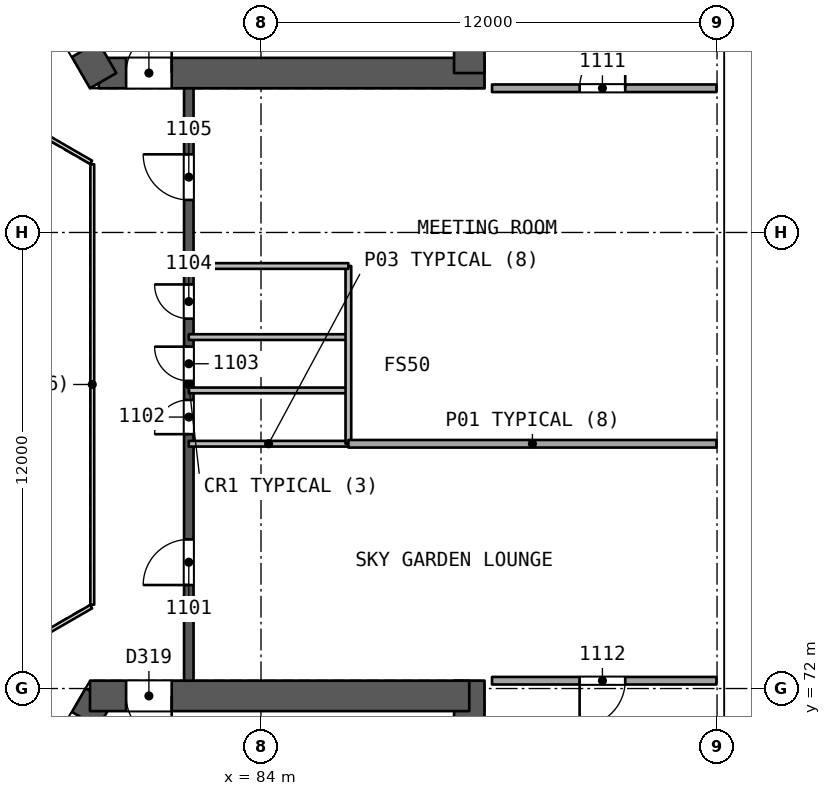
"""IFC4 building model, lengths in metres.
Left out: names, types, materials, properties, quantities, classifications, styles, units other than length and angle.
Written with IfcOpenShell. Run it as: python <this file> out.ifc"""

import sys

from ifc_helpers import new_model, si_unit, direction, frame, frame_2d, origin, place, context, subcontext, project, spatial, rectangle, extrude, element, fill, save


model = new_model("IFC4")
c1 = context("Model", 3, precision=1e-05, world=origin(), true_north=direction((0.0, 1.0)))
c2 = subcontext(c1, "Body", "Model", "MODEL_VIEW")
j1 = project(units=[si_unit("LENGTHUNIT", "METRE"), si_unit("PLANEANGLEUNIT", "RADIAN")], contexts=[c1])
p1 = place(None, origin())
s1 = spatial("IfcSite", under=j1, at=p1, CompositionType="ELEMENT")
p2 = place(p1, origin())
s2 = spatial("IfcBuilding", under=s1, at=p2, CompositionType="ELEMENT")
p3 = place(p2, frame((0.0, 0.0, 52.9)))
s3 = spatial("IfcBuildingStorey", under=s2, at=p3, CompositionType="ELEMENT", Elevation=52.9)
p4 = place(p3, frame((79.731, 88.194, 0.0), z_axis=(0.0, 0.0, 1.0), x_axis=(1.0, 0.0, 0.0)))
e1 = element("IfcWall", 1, at=p4, inside=s3, PredefinedType="SHEAR", context=c2, shape_type="SweptSolid", body=[
    extrude(rectangle(XDim=10.149, YDim=0.8, at=frame_2d((5.074, 0.0))), origin(), (0.0, 0.0, 1.0), 4.4),
])
p5 = place(p4, frame((0.719, 0.0, 0.0)))
e2 = element("IfcOpeningElement", 2, at=p5, cuts=e1, PredefinedType="OPENING", context=c2, shape_type="SweptSolid", body=[
    extrude(rectangle(XDim=1.2, YDim=2.1, at=frame_2d((0.6, 1.05))), frame((0.0, 0.411, 0.0), z_axis=(0.0, -1.0, 0.0), x_axis=(1.0, 0.0, 0.0)), (0.0, 0.0, 1.0), 0.821),
])
p6 = place(p3, frame((89.48, 88.194, 0.0), z_axis=(0.0, 0.0, 1.0), x_axis=(0.0, 1.0, 0.0)))
e3 = element("IfcWall", 3, at=p6, inside=s3, PredefinedType="SHEAR", context=c2, shape_type="SweptSolid", body=[
    extrude(rectangle(XDim=13.933, YDim=0.8, at=frame_2d((6.967, 0.0))), origin(), (0.0, 0.0, 1.0), 4.4),
])
p7 = place(p3, frame((74.856, 96.637, 0.0), z_axis=(0.0, 0.0, 1.0), x_axis=(0.499993500917, -0.866029155999, 0.0)))
e4 = element("IfcWall", 4, at=p7, inside=s3, PredefinedType="SHEAR", context=c2, shape_type="SweptSolid", body=[
    extrude(rectangle(XDim=9.98, YDim=0.8, at=frame_2d((4.99, 0.0))), origin(), (0.0, 0.0, 1.0), 4.4),
])
p8 = place(p7, frame((7.83, 0.0, 0.0)))
e5 = element("IfcOpeningElement", 5, at=p8, cuts=e4, PredefinedType="OPENING", context=c2, shape_type="SweptSolid", body=[
    extrude(rectangle(XDim=1.2, YDim=2.1, at=frame_2d((0.6, 1.05))), frame((0.0, 0.411, 0.0), z_axis=(0.0, -1.0, 0.0), x_axis=(1.0, 0.0, 0.0)), (0.0, 0.0, 1.0), 0.821),
])
p9 = place(p3, frame((79.731, 71.806, 0.0), z_axis=(0.0, 0.0, 1.0), x_axis=(-0.49999662545, -0.866027352073, 0.0)))
e6 = element("IfcWall", 6, at=p9, inside=s3, PredefinedType="SHEAR", context=c2, shape_type="SweptSolid", body=[
    extrude(rectangle(XDim=10.149, YDim=0.8, at=frame_2d((5.074, 0.0))), origin(), (0.0, 0.0, 1.0), 4.4),
])
p10 = place(p9, frame((0.719, 0.0, 0.0)))
e7 = element("IfcOpeningElement", 7, at=p10, cuts=e6, PredefinedType="OPENING", context=c2, shape_type="SweptSolid", body=[
    extrude(rectangle(XDim=1.2, YDim=2.1, at=frame_2d((0.6, 1.05))), frame((0.0, 0.411, 0.0), z_axis=(0.0, -1.0, 0.0), x_axis=(1.0, 0.0, 0.0)), (0.0, 0.0, 1.0), 0.821),
])
p11 = place(p3, frame((89.48, 58.103, 0.0), z_axis=(0.0, 0.0, 1.0), x_axis=(0.0, 1.0, 0.0)))
e8 = element("IfcWall", 8, at=p11, inside=s3, PredefinedType="SHEAR", context=c2, shape_type="SweptSolid", body=[
    extrude(rectangle(XDim=14.103, YDim=0.8, at=frame_2d((7.051, 0.0))), origin(), (0.0, 0.0, 1.0), 4.4),
])
p12 = place(p3, frame((89.48, 71.806, 0.0), z_axis=(0.0, 0.0, 1.0), x_axis=(-1.0, 0.0, 0.0)))
e9 = element("IfcWall", 9, at=p12, inside=s3, PredefinedType="SHEAR", context=c2, shape_type="SweptSolid", body=[
    extrude(rectangle(XDim=9.98, YDim=0.8, at=frame_2d((4.99, 0.0))), origin(), (0.0, 0.0, 1.0), 4.4),
])
p13 = place(p12, frame((7.83, 0.0, 0.0)))
e10 = element("IfcOpeningElement", 10, at=p13, cuts=e9, PredefinedType="OPENING", context=c2, shape_type="SweptSolid", body=[
    extrude(rectangle(XDim=1.2, YDim=2.1, at=frame_2d((0.6, 1.05))), frame((0.0, 0.411, 0.0), z_axis=(0.0, -1.0, 0.0), x_axis=(1.0, 0.0, 0.0)), (0.0, 0.0, 1.0), 0.821),
])
p14 = place(p3, frame((82.1, 72.206, 0.0), z_axis=(0.0, 0.0, 1.0), x_axis=(0.0, 1.0, 0.0)))
e11 = element("IfcWall", 11, at=p14, inside=s3, PredefinedType="SHEAR", context=c2, shape_type="SweptSolid", body=[
    extrude(rectangle(XDim=15.588, YDim=0.25, at=frame_2d((7.794, 0.0))), origin(), (0.0, 0.0, 1.0), 3.9),
])
p15 = place(p14, frame((2.518, 0.0, 0.0)))
e12 = element("IfcOpeningElement", 12, at=p15, cuts=e11, PredefinedType="OPENING", context=c2, shape_type="SweptSolid", body=[
    extrude(rectangle(XDim=1.2, YDim=2.4, at=frame_2d((0.6, 1.2))), frame((0.0, 0.135, 0.0), z_axis=(0.0, -1.0, 0.0), x_axis=(1.0, 0.0, 0.0)), (0.0, 0.0, 1.0), 0.271),
])
p16 = place(p14, frame((6.487, 0.0, 0.0)))
e13 = element("IfcOpeningElement", 13, at=p16, cuts=e11, PredefinedType="OPENING", context=c2, shape_type="SweptSolid", body=[
    extrude(rectangle(XDim=0.9, YDim=2.1, at=frame_2d((0.45, 1.05))), frame((0.0, 0.135, 0.0), z_axis=(0.0, -1.0, 0.0), x_axis=(1.0, 0.0, 0.0)), (0.0, 0.0, 1.0), 0.271),
])
p17 = place(p14, frame((7.89, 0.0, 0.0)))
e14 = element("IfcOpeningElement", 14, at=p17, cuts=e11, PredefinedType="OPENING", context=c2, shape_type="SweptSolid", body=[
    extrude(rectangle(XDim=0.9, YDim=2.1, at=frame_2d((0.45, 1.05))), frame((0.0, 0.135, 0.0), z_axis=(0.0, -1.0, 0.0), x_axis=(1.0, 0.0, 0.0)), (0.0, 0.0, 1.0), 0.271),
])
p18 = place(p14, frame((9.527, 0.0, 0.0)))
e15 = element("IfcOpeningElement", 15, at=p18, cuts=e11, PredefinedType="OPENING", context=c2, shape_type="SweptSolid", body=[
    extrude(rectangle(XDim=0.9, YDim=2.1, at=frame_2d((0.45, 1.05))), frame((0.0, 0.135, 0.0), z_axis=(0.0, -1.0, 0.0), x_axis=(1.0, 0.0, 0.0)), (0.0, 0.0, 1.0), 0.271),
])
p19 = place(p14, frame((12.65, 0.0, 0.0)))
e16 = element("IfcOpeningElement", 16, at=p19, cuts=e11, PredefinedType="OPENING", context=c2, shape_type="SweptSolid", body=[
    extrude(rectangle(XDim=1.2, YDim=2.4, at=frame_2d((0.6, 1.2))), frame((0.0, 0.135, 0.0), z_axis=(0.0, -1.0, 0.0), x_axis=(1.0, 0.0, 0.0)), (0.0, 0.0, 1.0), 0.271),
])
p20 = place(p3, frame((86.3, 78.441, 0.0), z_axis=(0.0, 0.0, 1.0), x_axis=(-1.0, 0.0, 0.0)))
e17 = element("IfcWall", 17, at=p20, inside=s3, PredefinedType="PARTITIONING", context=c2, shape_type="SweptSolid", body=[
    extrude(rectangle(XDim=4.2, YDim=0.15, at=frame_2d((2.1, 0.0))), origin(), (0.0, 0.0, 1.0), 3.9),
])
p21 = place(p3, frame((95.984, 78.44, 0.0), z_axis=(0.0, 0.0, 1.0), x_axis=(-1.0, 0.0, 0.0)))
e18 = element("IfcWall", 18, at=p21, inside=s3, PredefinedType="PARTITIONING", context=c2, shape_type="SweptSolid", body=[
    extrude(rectangle(XDim=9.684, YDim=0.2, at=frame_2d((4.842, 0.0))), origin(), (0.0, 0.0, 1.0), 3.9),
])
p22 = place(p3, frame((95.984, 72.206, 0.0), z_axis=(0.0, 0.0, 1.0), x_axis=(-1.0, 0.0, 0.0)))
e19 = element("IfcWall", 19, at=p22, inside=s3, PredefinedType="PARTITIONING", context=c2, shape_type="SweptSolid", body=[
    extrude(rectangle(XDim=5.905, YDim=0.2, at=frame_2d((2.952, 0.0))), origin(), (0.0, 0.0, 1.0), 3.9),
])
p23 = place(p22, frame((2.4, 0.0, 0.0)))
e20 = element("IfcOpeningElement", 20, at=p23, cuts=e19, PredefinedType="OPENING", context=c2, shape_type="SweptSolid", body=[
    extrude(rectangle(XDim=1.2, YDim=2.4, at=frame_2d((0.6, 1.2))), frame((0.0, 0.11, 0.0), z_axis=(0.0, -1.0, 0.0), x_axis=(1.0, 0.0, 0.0)), (0.0, 0.0, 1.0), 0.221),
])
for number, where, z_axis, x_axis in (
    (21, (86.3, 79.844, 0.0), (0.0, 0.0, 1.0), (-1.0, 0.0, 0.0)),
    (22, (86.3, 81.247, 0.0), (0.0, 0.0, 1.0), (-1.0, 0.0, 0.0)),
):
    element("IfcWall", number, at=place(p3, frame(where, z_axis=z_axis, x_axis=x_axis)), inside=s3, PredefinedType="PARTITIONING", context=c2, shape_type="SweptSolid", body=[
        extrude(rectangle(XDim=4.2, YDim=0.15, at=frame_2d((2.1, 0.0))), origin(), (0.0, 0.0, 1.0), 3.9),
    ])
p24 = place(p3, frame((86.299, 78.441, 0.0), z_axis=(0.0, 0.0, 1.0), x_axis=(0.0, 1.0, 0.0)))
e23 = element("IfcWall", 23, at=p24, inside=s3, PredefinedType="PARTITIONING", context=c2, shape_type="SweptSolid", body=[
    extrude(rectangle(XDim=4.677, YDim=0.15, at=frame_2d((2.338, 0.0))), origin(), (0.0, 0.0, 1.0), 3.9),
])
p25 = place(p3, frame((86.299, 83.118, 0.0), z_axis=(0.0, 0.0, 1.0), x_axis=(-1.0, 0.0, 0.0)))
e24 = element("IfcWall", 24, at=p25, inside=s3, PredefinedType="PARTITIONING", context=c2, shape_type="SweptSolid", body=[
    extrude(rectangle(XDim=4.199, YDim=0.15, at=frame_2d((2.1, 0.0))), origin(), (0.0, 0.0, 1.0), 3.9),
])
p26 = place(p3, frame((90.079, 87.794, 0.0), z_axis=(0.0, 0.0, 1.0), x_axis=(1.0, 0.0, 0.0)))
e25 = element("IfcWall", 25, at=p26, inside=s3, PredefinedType="PARTITIONING", context=c2, shape_type="SweptSolid", body=[
    extrude(rectangle(XDim=5.905, YDim=0.2, at=frame_2d((2.952, 0.0))), origin(), (0.0, 0.0, 1.0), 3.9),
])
p27 = place(p26, frame((2.305, 0.0, 0.0)))
e26 = element("IfcOpeningElement", 26, at=p27, cuts=e25, PredefinedType="OPENING", context=c2, shape_type="SweptSolid", body=[
    extrude(rectangle(XDim=1.2, YDim=2.4, at=frame_2d((0.6, 1.2))), frame((0.0, 0.11, 0.0), z_axis=(0.0, -1.0, 0.0), x_axis=(1.0, 0.0, 0.0)), (0.0, 0.0, 1.0), 0.221),
])
p28 = place(p3, frame((79.56, 74.206, 0.0), z_axis=(0.0, 0.0, 1.0), x_axis=(0.0, 1.0, 0.0)))
e27 = element("IfcWall", 27, at=p28, inside=s3, PredefinedType="PARTITIONING", context=c2, shape_type="SweptSolid", body=[
    extrude(rectangle(XDim=11.588, YDim=0.1, at=frame_2d((5.794, 0.0))), origin(), (0.0, 0.0, 1.0), 3.9),
])
for number, where, z_axis, x_axis in (
    (28, (79.53, 85.846, 0.0), (0.0, 0.0, 1.0), (-0.866, 0.5, 0.0)),
    (29, (77.798, 73.154, 0.0), (0.0, 0.0, 1.0), (0.866, 0.5, 0.0)),
):
    element("IfcWall", number, at=place(p3, frame(where, z_axis=z_axis, x_axis=x_axis)), inside=s3, PredefinedType="PARTITIONING", context=c2, shape_type="SweptSolid", body=[
        extrude(rectangle(XDim=2.0, YDim=0.1, at=frame_2d((1.0, 0.0))), origin(), (0.0, 0.0, 1.0), 3.9),
    ])
p29 = place(p15, origin())
e30 = element("IfcDoor", 30, at=p29, inside=s3, OperationType="SINGLE_SWING_LEFT", PredefinedType="NOTDEFINED", context=c2, shape_type="SweptSolid", body=[
    extrude(rectangle(XDim=1.2, YDim=2.4, at=frame_2d((0.6, 1.2))), frame((0.0, 0.025, 0.0), z_axis=(0.0, -1.0, 0.0), x_axis=(1.0, 0.0, 0.0)), (0.0, 0.0, 1.0), 0.05),
])
fill(e12, e30)
p30 = place(p16, origin())
e31 = element("IfcDoor", 31, at=p30, inside=s3, OperationType="SINGLE_SWING_LEFT", PredefinedType="NOTDEFINED", context=c2, shape_type="SweptSolid", body=[
    extrude(rectangle(XDim=0.9, YDim=2.1, at=frame_2d((0.45, 1.05))), frame((0.0, 0.025, 0.0), z_axis=(0.0, -1.0, 0.0), x_axis=(1.0, 0.0, 0.0)), (0.0, 0.0, 1.0), 0.05),
])
fill(e13, e31)
p31 = place(p17, origin())
e32 = element("IfcDoor", 32, at=p31, inside=s3, OperationType="SINGLE_SWING_RIGHT", PredefinedType="NOTDEFINED", context=c2, shape_type="SweptSolid", body=[
    extrude(rectangle(XDim=0.9, YDim=2.1, at=frame_2d((0.45, 1.05))), frame((0.0, 0.025, 0.0), z_axis=(0.0, -1.0, 0.0), x_axis=(1.0, 0.0, 0.0)), (0.0, 0.0, 1.0), 0.05),
])
fill(e14, e32)
p32 = place(p18, origin())
e33 = element("IfcDoor", 33, at=p32, inside=s3, OperationType="SINGLE_SWING_RIGHT", PredefinedType="NOTDEFINED", context=c2, shape_type="SweptSolid", body=[
    extrude(rectangle(XDim=0.9, YDim=2.1, at=frame_2d((0.45, 1.05))), frame((0.0, 0.025, 0.0), z_axis=(0.0, -1.0, 0.0), x_axis=(1.0, 0.0, 0.0)), (0.0, 0.0, 1.0), 0.05),
])
fill(e15, e33)
p33 = place(p19, origin())
e34 = element("IfcDoor", 34, at=p33, inside=s3, OperationType="SINGLE_SWING_RIGHT", PredefinedType="NOTDEFINED", context=c2, shape_type="SweptSolid", body=[
    extrude(rectangle(XDim=1.2, YDim=2.4, at=frame_2d((0.6, 1.2))), frame((0.0, 0.025, 0.0), z_axis=(0.0, -1.0, 0.0), x_axis=(1.0, 0.0, 0.0)), (0.0, 0.0, 1.0), 0.05),
])
fill(e16, e34)
p34 = place(p27, origin())
e35 = element("IfcDoor", 35, at=p34, inside=s3, OperationType="SINGLE_SWING_RIGHT", PredefinedType="NOTDEFINED", context=c2, shape_type="SweptSolid", body=[
    extrude(rectangle(XDim=1.2, YDim=2.4, at=frame_2d((0.6, 1.2))), frame((0.0, 0.025, 0.0), z_axis=(0.0, -1.0, 0.0), x_axis=(1.0, 0.0, 0.0)), (0.0, 0.0, 1.0), 0.05),
])
fill(e26, e35)
p35 = place(p23, origin())
e36 = element("IfcDoor", 36, at=p35, inside=s3, OperationType="SINGLE_SWING_RIGHT", PredefinedType="NOTDEFINED", context=c2, shape_type="SweptSolid", body=[
    extrude(rectangle(XDim=1.2, YDim=2.4, at=frame_2d((0.6, 1.2))), frame((0.0, 0.025, 0.0), z_axis=(0.0, -1.0, 0.0), x_axis=(1.0, 0.0, 0.0)), (0.0, 0.0, 1.0), 0.05),
])
fill(e20, e36)
p36 = place(p5, origin())
e37 = element("IfcDoor", 37, at=p36, inside=s3, OperationType="SINGLE_SWING_RIGHT", PredefinedType="NOTDEFINED", context=c2, shape_type="SweptSolid", body=[
    extrude(rectangle(XDim=1.2, YDim=2.1, at=frame_2d((0.6, 1.05))), frame((0.0, 0.025, 0.0), z_axis=(0.0, -1.0, 0.0), x_axis=(1.0, 0.0, 0.0)), (0.0, 0.0, 1.0), 0.05),
])
fill(e2, e37)
p37 = place(p13, origin())
e38 = element("IfcDoor", 38, at=p37, inside=s3, OperationType="SINGLE_SWING_LEFT", PredefinedType="NOTDEFINED", context=c2, shape_type="SweptSolid", body=[
    extrude(rectangle(XDim=1.2, YDim=2.1, at=frame_2d((0.6, 1.05))), frame((0.0, 0.025, 0.0), z_axis=(0.0, -1.0, 0.0), x_axis=(1.0, 0.0, 0.0)), (0.0, 0.0, 1.0), 0.05),
])
fill(e10, e38)
save(model, sys.argv[1])
